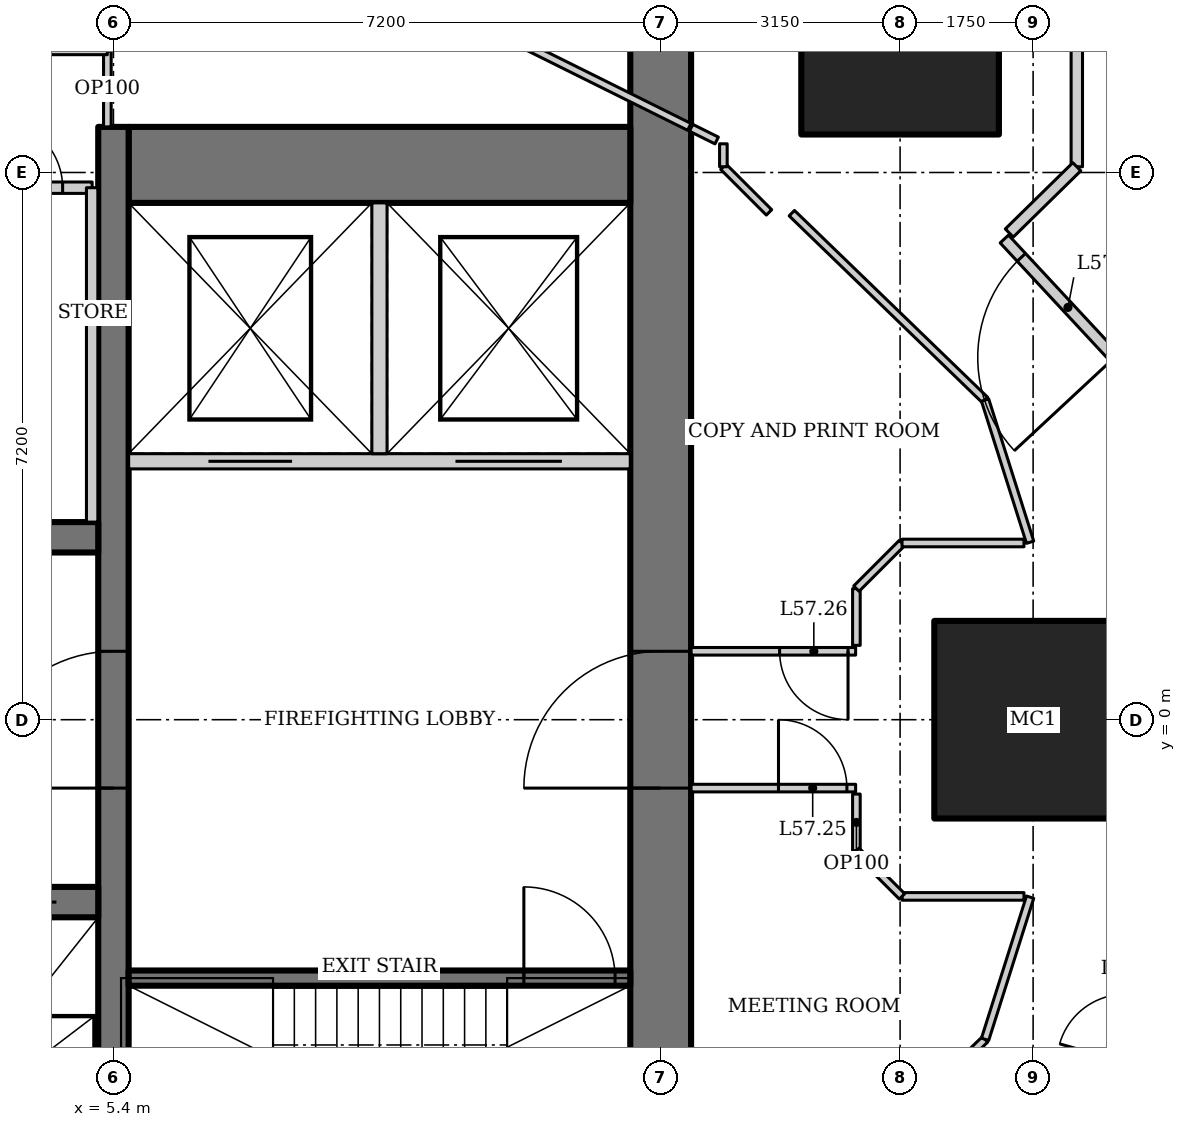
"""IFC4 building model, lengths in metres.
Left out: names, types, materials, properties, quantities, classifications, styles, units other than length and angle.
Written with IfcOpenShell. Run it as: python <this file> out.ifc"""

import sys

from ifc_helpers import new_model, si_unit, direction, frame, frame_2d, origin, origin_2d, place, context, subcontext, project, spatial, rectangle, hollow_rectangle, extrude, element, fill, save


model = new_model("IFC4")
c1 = context("Model", 3, precision=1e-05, world=origin(), true_north=direction((0.0, 1.0)))
c2 = subcontext(c1, "Body", "Model", "MODEL_VIEW")
j1 = project(units=[si_unit("LENGTHUNIT", "METRE"), si_unit("PLANEANGLEUNIT", "RADIAN")], contexts=[c1])
p1 = place(None, origin())
s1 = spatial("IfcSite", under=j1, at=p1, CompositionType="ELEMENT")
p2 = place(p1, origin())
s2 = spatial("IfcBuilding", under=s1, at=p2, CompositionType="ELEMENT")
p3 = place(p2, frame((0.0, 0.0, 245.2)))
s3 = spatial("IfcBuildingStorey", under=s2, at=p3, CompositionType="ELEMENT", Elevation=245.2)
for number, where, z_axis, x_axis in (
    (1, (17.5, 0.0, 0.0), (0.0, 0.0, 1.0), (1.0, 0.0, 0.0)),
    (2, (15.75, 9.0, 0.0), (0.0, 0.0, 1.0), (1.0, 0.0, 0.0)),
):
    element("IfcColumn", number, at=place(p3, frame(where, z_axis=z_axis, x_axis=x_axis)), inside=s3, PredefinedType="COLUMN", context=c2, shape_type="SweptSolid", body=[
        extrude(hollow_rectangle(XDim=2.6, YDim=2.6, WallThickness=0.13, at=origin_2d()), origin(), (0.0, 0.0, 1.0), 4.2),
    ])
p4 = place(p3, frame((12.6, -11.0, 0.0), z_axis=(0.0, 0.0, 1.0), x_axis=(0.0, 1.0, 0.0)))
e3 = element("IfcWall", 3, at=p4, inside=s3, PredefinedType="SHEAR", context=c2, shape_type="SweptSolid", body=[
    extrude(rectangle(XDim=22.0, YDim=0.8, at=frame_2d((11.0, 0.0))), origin(), (0.0, 0.0, 1.0), 4.2),
])
p5 = place(p4, frame((10.1, 0.0, 0.0)))
e4 = element("IfcOpeningElement", 4, at=p5, cuts=e3, PredefinedType="OPENING", context=c2, shape_type="SweptSolid", body=[
    extrude(rectangle(XDim=1.8, YDim=2.1, at=frame_2d((0.9, 1.05))), frame((0.0, 0.41, 0.0), z_axis=(0.0, -1.0, 0.0), x_axis=(1.0, 0.0, 0.0)), (0.0, 0.0, 1.0), 0.82),
])
p6 = place(p3, frame((12.2, 7.3, 0.0), z_axis=(0.0, 0.0, 1.0), x_axis=(-1.0, 0.0, 0.0)))
e5 = element("IfcWall", 5, at=p6, inside=s3, PredefinedType="SHEAR", context=c2, shape_type="SweptSolid", body=[
    extrude(rectangle(XDim=6.6, YDim=1.0, at=frame_2d((3.3, 0.0))), origin(), (0.0, 0.0, 1.0), 4.2),
])
p7 = place(p3, frame((5.4, -6.8, 0.0), z_axis=(0.0, 0.0, 1.0), x_axis=(0.0, 1.0, 0.0)))
e6 = element("IfcWall", 6, at=p7, inside=s3, PredefinedType="SHEAR", context=c2, shape_type="SweptSolid", body=[
    extrude(rectangle(XDim=14.6, YDim=0.4, at=frame_2d((7.3, 0.0))), origin(), (0.0, 0.0, 1.0), 4.2),
])
p8 = place(p7, frame((5.9, 0.0, 0.0)))
e7 = element("IfcOpeningElement", 7, at=p8, cuts=e6, PredefinedType="OPENING", context=c2, shape_type="SweptSolid", body=[
    extrude(rectangle(XDim=1.8, YDim=2.1, at=frame_2d((0.9, 1.05))), frame((0.0, 0.21, 0.0), z_axis=(0.0, -1.0, 0.0), x_axis=(1.0, 0.0, 0.0)), (0.0, 0.0, 1.0), 0.42),
])
p9 = place(p3, frame((-5.2, -2.4, 0.0), z_axis=(0.0, 0.0, 1.0), x_axis=(1.0, 0.0, 0.0)))
e8 = element("IfcWall", 8, at=p9, inside=s3, PredefinedType="SHEAR", context=c2, shape_type="SweptSolid", body=[
    extrude(rectangle(XDim=10.4, YDim=0.4, at=frame_2d((5.2, 0.0))), origin(), (0.0, 0.0, 1.0), 4.2),
])
p10 = place(p9, frame((1.683, 0.0, 0.0)))
e9 = element("IfcOpeningElement", 9, at=p10, cuts=e8, PredefinedType="OPENING", context=c2, shape_type="SweptSolid", body=[
    extrude(rectangle(XDim=1.1, YDim=2.2, at=frame_2d((0.55, 1.1))), frame((0.0, 0.21, 0.0), z_axis=(0.0, -1.0, 0.0), x_axis=(1.0, 0.0, 0.0)), (0.0, 0.0, 1.0), 0.42),
])
p11 = place(p9, frame((5.217, 0.0, 0.0)))
e10 = element("IfcOpeningElement", 10, at=p11, cuts=e8, PredefinedType="OPENING", context=c2, shape_type="SweptSolid", body=[
    extrude(rectangle(XDim=1.1, YDim=2.2, at=frame_2d((0.55, 1.1))), frame((0.0, 0.21, 0.0), z_axis=(0.0, -1.0, 0.0), x_axis=(1.0, 0.0, 0.0)), (0.0, 0.0, 1.0), 0.42),
])
p12 = place(p9, frame((8.75, 0.0, 0.0)))
e11 = element("IfcOpeningElement", 11, at=p12, cuts=e8, PredefinedType="OPENING", context=c2, shape_type="SweptSolid", body=[
    extrude(rectangle(XDim=1.1, YDim=2.2, at=frame_2d((0.55, 1.1))), frame((0.0, 0.21, 0.0), z_axis=(0.0, -1.0, 0.0), x_axis=(1.0, 0.0, 0.0)), (0.0, 0.0, 1.0), 0.42),
])
p13 = place(p3, frame((5.2, 2.4, 0.0), z_axis=(0.0, 0.0, 1.0), x_axis=(-1.0, 0.0, 0.0)))
e12 = element("IfcWall", 12, at=p13, inside=s3, PredefinedType="SHEAR", context=c2, shape_type="SweptSolid", body=[
    extrude(rectangle(XDim=10.4, YDim=0.4, at=frame_2d((5.2, 0.0))), origin(), (0.0, 0.0, 1.0), 4.2),
])
p14 = place(p3, frame((5.6, -3.4, 0.0), z_axis=(0.0, 0.0, 1.0), x_axis=(1.0, 0.0, 0.0)))
e13 = element("IfcWall", 13, at=p14, inside=s3, PredefinedType="SHEAR", context=c2, shape_type="SweptSolid", body=[
    extrude(rectangle(XDim=6.6, YDim=0.2, at=frame_2d((3.3, 0.0))), origin(), (0.0, 0.0, 1.0), 4.2),
])
p15 = place(p14, frame((5.2, 0.0, 0.0)))
e14 = element("IfcOpeningElement", 14, at=p15, cuts=e13, PredefinedType="OPENING", context=c2, shape_type="SweptSolid", body=[
    extrude(rectangle(XDim=1.2, YDim=2.1, at=frame_2d((0.6, 1.05))), frame((0.0, 0.11, 0.0), z_axis=(0.0, -1.0, 0.0), x_axis=(1.0, 0.0, 0.0)), (0.0, 0.0, 1.0), 0.22),
])
p16 = place(p3, frame((12.2, 3.4, 0.0), z_axis=(0.0, 0.0, 1.0), x_axis=(-1.0, 0.0, 0.0)))
e15 = element("IfcWall", 15, at=p16, inside=s3, PredefinedType="SOLIDWALL", context=c2, shape_type="SweptSolid", body=[
    extrude(rectangle(XDim=6.6, YDim=0.2, at=frame_2d((3.3, 0.0))), origin(), (0.0, 0.0, 1.0), 4.2),
])
p17 = place(p16, frame((4.45, 0.0, 0.0)))
e16 = element("IfcOpeningElement", 16, at=p17, cuts=e15, PredefinedType="OPENING", context=c2, shape_type="SweptSolid", body=[
    extrude(rectangle(XDim=1.1, YDim=2.2, at=frame_2d((0.55, 1.1))), frame((0.0, 0.11, 0.0), z_axis=(0.0, -1.0, 0.0), x_axis=(1.0, 0.0, 0.0)), (0.0, 0.0, 1.0), 0.22),
])
p18 = place(p16, frame((0.9, 0.0, 0.0)))
e17 = element("IfcOpeningElement", 17, at=p18, cuts=e15, PredefinedType="OPENING", context=c2, shape_type="SweptSolid", body=[
    extrude(rectangle(XDim=1.4, YDim=2.2, at=frame_2d((0.7, 1.1))), frame((0.0, 0.11, 0.0), z_axis=(0.0, -1.0, 0.0), x_axis=(1.0, 0.0, 0.0)), (0.0, 0.0, 1.0), 0.22),
])
p19 = place(p3, frame((8.9, 3.5, 0.0), z_axis=(0.0, 0.0, 1.0), x_axis=(0.0, 1.0, 0.0)))
e18 = element("IfcWall", 18, at=p19, inside=s3, PredefinedType="SOLIDWALL", context=c2, shape_type="SweptSolid", body=[
    extrude(rectangle(XDim=3.3, YDim=0.2, at=frame_2d((1.65, 0.0))), origin(), (0.0, 0.0, 1.0), 4.2),
])
p20 = place(p3, frame((-5.12, 7.0, 0.0), z_axis=(0.0, 0.0, 1.0), x_axis=(1.0, 0.0, 0.0)))
e19 = element("IfcWall", 19, at=p20, inside=s3, PredefinedType="SOLIDWALL", context=c2, shape_type="SweptSolid", body=[
    extrude(rectangle(XDim=10.24, YDim=0.15, at=frame_2d((5.12, 0.0))), origin(), (0.0, 0.0, 1.0), 4.05),
])
p21 = place(p20, frame((1.2, 0.0, 0.0)))
e20 = element("IfcOpeningElement", 20, at=p21, cuts=e19, PredefinedType="OPENING", context=c2, shape_type="SweptSolid", body=[
    extrude(rectangle(XDim=0.9, YDim=2.1, at=frame_2d((0.45, 1.05))), frame((0.0, 0.085, 0.0), z_axis=(0.0, -1.0, 0.0), x_axis=(1.0, 0.0, 0.0)), (0.0, 0.0, 1.0), 0.17),
])
p22 = place(p20, frame((4.477, 0.0, 0.0)))
e21 = element("IfcOpeningElement", 21, at=p22, cuts=e19, PredefinedType="OPENING", context=c2, shape_type="SweptSolid", body=[
    extrude(rectangle(XDim=0.9, YDim=2.1, at=frame_2d((0.45, 1.05))), frame((0.0, 0.085, 0.0), z_axis=(0.0, -1.0, 0.0), x_axis=(1.0, 0.0, 0.0)), (0.0, 0.0, 1.0), 0.17),
])
p23 = place(p20, frame((7.054, 0.0, 0.0)))
e22 = element("IfcOpeningElement", 22, at=p23, cuts=e19, PredefinedType="OPENING", context=c2, shape_type="SweptSolid", body=[
    extrude(rectangle(XDim=1.0, YDim=2.1, at=frame_2d((0.5, 1.05))), frame((0.0, 0.085, 0.0), z_axis=(0.0, -1.0, 0.0), x_axis=(1.0, 0.0, 0.0)), (0.0, 0.0, 1.0), 0.17),
])
p24 = place(p20, frame((8.952, 0.0, 0.0)))
e23 = element("IfcOpeningElement", 23, at=p24, cuts=e19, PredefinedType="OPENING", context=c2, shape_type="SweptSolid", body=[
    extrude(rectangle(XDim=0.9, YDim=2.1, at=frame_2d((0.45, 1.05))), frame((0.0, 0.085, 0.0), z_axis=(0.0, -1.0, 0.0), x_axis=(1.0, 0.0, 0.0)), (0.0, 0.0, 1.0), 0.17),
])
p25 = place(p3, frame((5.12, 2.6, 0.0), z_axis=(0.0, 0.0, 1.0), x_axis=(0.0, 1.0, 0.0)))
e24 = element("IfcWall", 24, at=p25, inside=s3, PredefinedType="SOLIDWALL", context=c2, shape_type="SweptSolid", body=[
    extrude(rectangle(XDim=4.4, YDim=0.15, at=frame_2d((2.2, 0.0))), origin(), (0.0, 0.0, 1.0), 4.05),
])
p26 = place(p3, frame((13.0, 7.788, 0.0), z_axis=(0.0, 0.0, 1.0), x_axis=(0.895721570004, -0.444615416995, 0.0)))
e25 = element("IfcWall", 25, at=p26, inside=s3, PredefinedType="PARTITIONING", context=c2, shape_type="SweptSolid", body=[
    extrude(rectangle(XDim=0.376, YDim=0.1, at=frame_2d((0.188, 0.0))), origin(), (0.0, 0.0, 1.0), 4.05),
])
p27 = place(p3, frame((5.32, 7.8, 0.0), z_axis=(0.0, 0.0, 1.0), x_axis=(0.0, 1.0, 0.0)))
e26 = element("IfcWall", 26, at=p27, inside=s3, PredefinedType="PARTITIONING", context=c2, shape_type="SweptSolid", body=[
    extrude(rectangle(XDim=1.0, YDim=0.1, at=frame_2d((0.5, 0.0))), origin(), (0.0, 0.0, 1.0), 4.05),
])
p28 = place(p3, frame((5.32, 8.8, 0.0), z_axis=(0.0, 0.0, 1.0), x_axis=(-1.0, 0.0, 0.0)))
e27 = element("IfcWall", 27, at=p28, inside=s3, PredefinedType="PARTITIONING", context=c2, shape_type="SweptSolid", body=[
    extrude(rectangle(XDim=4.42, YDim=0.1, at=frame_2d((2.21, 0.0))), origin(), (0.0, 0.0, 1.0), 4.05),
])
p29 = place(p28, frame((1.76, 0.0, 0.0)))
e28 = element("IfcOpeningElement", 28, at=p29, cuts=e27, PredefinedType="OPENING", context=c2, shape_type="SweptSolid", body=[
    extrude(rectangle(XDim=0.9, YDim=2.1, at=frame_2d((0.45, 1.05))), frame((0.0, 0.06, 0.0), z_axis=(0.0, -1.0, 0.0), x_axis=(1.0, 0.0, 0.0)), (0.0, 0.0, 1.0), 0.12),
])
p30 = place(p3, frame((9.298, 9.628, 0.0), z_axis=(0.0, 0.0, 1.0), x_axis=(0.895529831139, -0.445001484874, 0.0)))
e29 = element("IfcWall", 29, at=p30, inside=s3, PredefinedType="PARTITIONING", context=c2, shape_type="SweptSolid", body=[
    extrude(rectangle(XDim=4.108, YDim=0.1, at=frame_2d((2.054, 0.0))), origin(), (0.0, 0.0, 1.0), 4.05),
])
p31 = place(p3, frame((16.868, -4.206, 0.0), z_axis=(0.0, 0.0, 1.0), x_axis=(-0.718810161381, -0.695206409562, 0.0)))
e30 = element("IfcWall", 30, at=p31, inside=s3, PredefinedType="PARTITIONING", context=c2, shape_type="SweptSolid", body=[
    extrude(rectangle(XDim=3.537, YDim=0.1, at=frame_2d((1.769, 0.0))), origin(), (0.0, 0.0, 1.0), 4.05),
])
p32 = place(p3, frame((18.673, 4.656, 0.0), z_axis=(0.0, 0.0, 1.0), x_axis=(-0.680985069419, 0.732297299755, 0.0)))
e31 = element("IfcWall", 31, at=p32, inside=s3, PredefinedType="PARTITIONING", context=c2, shape_type="SweptSolid", body=[
    extrude(rectangle(XDim=2.279, YDim=0.15, at=frame_2d((1.14, 0.0))), origin(), (0.0, 0.0, 1.0), 4.05),
])
p33 = place(p32, frame((0.15, 0.0, 0.0)))
e32 = element("IfcOpeningElement", 32, at=p33, cuts=e31, PredefinedType="OPENING", context=c2, shape_type="SweptSolid", body=[
    extrude(rectangle(XDim=1.8, YDim=2.1, at=frame_2d((0.9, 1.05))), frame((0.0, 0.085, 0.0), z_axis=(0.0, -1.0, 0.0), x_axis=(1.0, 0.0, 0.0)), (0.0, 0.0, 1.0), 0.17),
])
p34 = place(p3, frame((14.325, 6.665, 0.0), z_axis=(0.0, 0.0, 1.0), x_axis=(0.718810161381, -0.695206409562, 0.0)))
e33 = element("IfcWall", 33, at=p34, inside=s3, PredefinedType="PARTITIONING", context=c2, shape_type="SweptSolid", body=[
    extrude(rectangle(XDim=3.537, YDim=0.1, at=frame_2d((1.769, 0.0))), origin(), (0.0, 0.0, 1.0), 4.05),
])
p35 = place(p3, frame((14.025, 6.675, 0.0), z_axis=(0.0, 0.0, 1.0), x_axis=(-0.707106781187, 0.707106781187, 0.0)))
e34 = element("IfcWall", 34, at=p35, inside=s3, PredefinedType="PARTITIONING", context=c2, shape_type="SweptSolid", body=[
    extrude(rectangle(XDim=0.849, YDim=0.1, at=frame_2d((0.425, 0.0))), origin(), (0.0, 0.0, 1.0), 4.05),
])
p36 = place(p3, frame((13.425, 7.275, 0.0), z_axis=(0.0, 0.0, 1.0), x_axis=(0.0, 1.0, 0.0)))
e35 = element("IfcWall", 35, at=p36, inside=s3, PredefinedType="PARTITIONING", context=c2, shape_type="SweptSolid", body=[
    extrude(rectangle(XDim=0.302, YDim=0.1, at=frame_2d((0.151, 0.0))), origin(), (0.0, 0.0, 1.0), 4.05),
])
p37 = place(p3, frame((18.075, 10.725, 0.0), z_axis=(0.0, 0.0, 1.0), x_axis=(0.0, -1.0, 0.0)))
e36 = element("IfcWall", 36, at=p37, inside=s3, PredefinedType="PARTITIONING", context=c2, shape_type="SweptSolid", body=[
    extrude(rectangle(XDim=3.449, YDim=0.15, at=frame_2d((1.725, 0.0))), origin(), (0.0, 0.0, 1.0), 3.601),
])
p38 = place(p3, frame((18.075, 7.275, 0.0), z_axis=(0.0, 0.0, 1.0), x_axis=(-0.713842064016, -0.700306723973, 0.0)))
e37 = element("IfcWall", 37, at=p38, inside=s3, PredefinedType="PARTITIONING", context=c2, shape_type="SweptSolid", body=[
    extrude(rectangle(XDim=1.245, YDim=0.15, at=frame_2d((0.622, 0.0))), origin(), (0.0, 0.0, 1.0), 4.05),
])
p39 = place(p3, frame((13.0, -0.9, 0.0), z_axis=(0.0, 0.0, 1.0), x_axis=(1.0, 0.0, 0.0)))
e38 = element("IfcWall", 38, at=p39, inside=s3, PredefinedType="PARTITIONING", context=c2, shape_type="SweptSolid", body=[
    extrude(rectangle(XDim=2.165, YDim=0.1, at=frame_2d((1.083, 0.0))), origin(), (0.0, 0.0, 1.0), 4.05),
])
p40 = place(p39, frame((1.15, 0.0, 0.0)))
e39 = element("IfcOpeningElement", 39, at=p40, cuts=e38, PredefinedType="OPENING", context=c2, shape_type="SweptSolid", body=[
    extrude(rectangle(XDim=0.9, YDim=2.1, at=frame_2d((0.45, 1.05))), frame((0.0, 0.06, 0.0), z_axis=(0.0, -1.0, 0.0), x_axis=(1.0, 0.0, 0.0)), (0.0, 0.0, 1.0), 0.12),
])
for number, where, z_axis, x_axis in (
    (40, (17.46, -2.335, 0.0), (0.0, 0.0, 1.0), (-0.302, -0.953, 0.0)),
    (41, (16.868, 4.206, 0.0), (0.0, 0.0, 1.0), (0.302, -0.953, 0.0)),
):
    element("IfcWall", number, at=place(p3, frame(where, z_axis=z_axis, x_axis=x_axis)), inside=s3, PredefinedType="PARTITIONING", context=c2, shape_type="SweptSolid", body=[
        extrude(rectangle(XDim=1.962, YDim=0.1, at=frame_2d((0.981, 0.0))), origin(), (0.0, 0.0, 1.0), 4.05),
    ])
p41 = place(p3, frame((15.165, 0.9, 0.0), z_axis=(0.0, 0.0, 1.0), x_axis=(-1.0, 0.0, 0.0)))
e42 = element("IfcWall", 42, at=p41, inside=s3, PredefinedType="PARTITIONING", context=c2, shape_type="SweptSolid", body=[
    extrude(rectangle(XDim=2.165, YDim=0.1, at=frame_2d((1.083, 0.0))), origin(), (0.0, 0.0, 1.0), 4.05),
])
p42 = place(p41, frame((0.1, 0.0, 0.0)))
e43 = element("IfcOpeningElement", 43, at=p42, cuts=e42, PredefinedType="OPENING", context=c2, shape_type="SweptSolid", body=[
    extrude(rectangle(XDim=0.9, YDim=2.1, at=frame_2d((0.45, 1.05))), frame((0.0, 0.06, 0.0), z_axis=(0.0, -1.0, 0.0), x_axis=(1.0, 0.0, 0.0)), (0.0, 0.0, 1.0), 0.12),
])
p43 = place(p3, frame((15.175, -1.725, 0.0), z_axis=(0.0, 0.0, 1.0), x_axis=(0.0, 1.0, 0.0)))
e44 = element("IfcWall", 44, at=p43, inside=s3, PredefinedType="PARTITIONING", context=c2, shape_type="SweptSolid", body=[
    extrude(rectangle(XDim=0.746, YDim=0.1, at=frame_2d((0.373, 0.0))), origin(), (0.0, 0.0, 1.0), 4.05),
])
p44 = place(p3, frame((17.38, -2.325, 0.0), z_axis=(0.0, 0.0, 1.0), x_axis=(-1.0, 0.0, 0.0)))
e45 = element("IfcWall", 45, at=p44, inside=s3, PredefinedType="PARTITIONING", context=c2, shape_type="SweptSolid", body=[
    extrude(rectangle(XDim=1.604, YDim=0.1, at=frame_2d((0.802, 0.0))), origin(), (0.0, 0.0, 1.0), 4.05),
])
p45 = place(p3, frame((15.775, -2.325, 0.0), z_axis=(0.0, 0.0, 1.0), x_axis=(-0.707106781187, 0.707106781187, 0.0)))
e46 = element("IfcWall", 46, at=p45, inside=s3, PredefinedType="PARTITIONING", context=c2, shape_type="SweptSolid", body=[
    extrude(rectangle(XDim=0.849, YDim=0.1, at=frame_2d((0.425, 0.0))), origin(), (0.0, 0.0, 1.0), 4.05),
])
p46 = place(p3, frame((15.175, 0.978, 0.0), z_axis=(0.0, 0.0, 1.0), x_axis=(0.0, 1.0, 0.0)))
e47 = element("IfcWall", 47, at=p46, inside=s3, PredefinedType="PARTITIONING", context=c2, shape_type="SweptSolid", body=[
    extrude(rectangle(XDim=0.746, YDim=0.1, at=frame_2d((0.373, 0.0))), origin(), (0.0, 0.0, 1.0), 4.05),
])
p47 = place(p3, frame((15.175, 1.725, 0.0), z_axis=(0.0, 0.0, 1.0), x_axis=(0.707106781187, 0.707106781187, 0.0)))
e48 = element("IfcWall", 48, at=p47, inside=s3, PredefinedType="PARTITIONING", context=c2, shape_type="SweptSolid", body=[
    extrude(rectangle(XDim=0.849, YDim=0.1, at=frame_2d((0.425, 0.0))), origin(), (0.0, 0.0, 1.0), 4.05),
])
p48 = place(p3, frame((15.775, 2.325, 0.0), z_axis=(0.0, 0.0, 1.0), x_axis=(1.0, 0.0, 0.0)))
e49 = element("IfcWall", 49, at=p48, inside=s3, PredefinedType="PARTITIONING", context=c2, shape_type="SweptSolid", body=[
    extrude(rectangle(XDim=1.604, YDim=0.1, at=frame_2d((0.802, 0.0))), origin(), (0.0, 0.0, 1.0), 4.05),
])
p49 = place(p8, origin())
e50 = element("IfcDoor", 50, at=p49, inside=s3, OperationType="DOUBLE_DOOR_DOUBLE_SWING", PredefinedType="DOOR", context=c2, shape_type="SweptSolid", body=[
    extrude(rectangle(XDim=1.8, YDim=2.1, at=frame_2d((0.9, 1.05))), frame((0.0, 0.025, 0.0), z_axis=(0.0, -1.0, 0.0), x_axis=(1.0, 0.0, 0.0)), (0.0, 0.0, 1.0), 0.05),
])
fill(e7, e50)
p50 = place(p15, origin())
e51 = element("IfcDoor", 51, at=p50, inside=s3, OperationType="SINGLE_SWING_RIGHT", PredefinedType="DOOR", context=c2, shape_type="SweptSolid", body=[
    extrude(rectangle(XDim=1.2, YDim=2.1, at=frame_2d((0.6, 1.05))), frame((0.0, 0.025, 0.0), z_axis=(0.0, -1.0, 0.0), x_axis=(1.0, 0.0, 0.0)), (0.0, 0.0, 1.0), 0.05),
])
fill(e14, e51)
p51 = place(p5, origin())
e52 = element("IfcDoor", 52, at=p51, inside=s3, OperationType="DOUBLE_DOOR_DOUBLE_SWING", PredefinedType="DOOR", context=c2, shape_type="SweptSolid", body=[
    extrude(rectangle(XDim=1.8, YDim=2.1, at=frame_2d((0.9, 1.05))), frame((0.0, 0.025, 0.0), z_axis=(0.0, -1.0, 0.0), x_axis=(1.0, 0.0, 0.0)), (0.0, 0.0, 1.0), 0.05),
])
fill(e4, e52)
p52 = place(p12, origin())
e53 = element("IfcDoor", 53, at=p52, inside=s3, OperationType="DOUBLE_DOOR_SLIDING", PredefinedType="DOOR", context=c2, shape_type="SweptSolid", body=[
    extrude(rectangle(XDim=1.1, YDim=2.2, at=frame_2d((0.55, 1.1))), frame((0.0, 0.025, 0.0), z_axis=(0.0, -1.0, 0.0), x_axis=(1.0, 0.0, 0.0)), (0.0, 0.0, 1.0), 0.05),
])
fill(e11, e53)
p53 = place(p17, origin())
e54 = element("IfcDoor", 54, at=p53, inside=s3, OperationType="DOUBLE_DOOR_SLIDING", PredefinedType="DOOR", context=c2, shape_type="SweptSolid", body=[
    extrude(rectangle(XDim=1.1, YDim=2.2, at=frame_2d((0.55, 1.1))), frame((0.0, 0.025, 0.0), z_axis=(0.0, -1.0, 0.0), x_axis=(1.0, 0.0, 0.0)), (0.0, 0.0, 1.0), 0.05),
])
fill(e16, e54)
p54 = place(p18, origin())
e55 = element("IfcDoor", 55, at=p54, inside=s3, OperationType="DOUBLE_DOOR_SLIDING", PredefinedType="DOOR", context=c2, shape_type="SweptSolid", body=[
    extrude(rectangle(XDim=1.4, YDim=2.2, at=frame_2d((0.7, 1.1))), frame((0.0, 0.025, 0.0), z_axis=(0.0, -1.0, 0.0), x_axis=(1.0, 0.0, 0.0)), (0.0, 0.0, 1.0), 0.05),
])
fill(e17, e55)
p55 = place(p24, origin())
e56 = element("IfcDoor", 56, at=p55, inside=s3, OperationType="SINGLE_SWING_LEFT", PredefinedType="DOOR", context=c2, shape_type="SweptSolid", body=[
    extrude(rectangle(XDim=0.9, YDim=2.1, at=frame_2d((0.45, 1.05))), frame((0.0, 0.025, 0.0), z_axis=(0.0, -1.0, 0.0), x_axis=(1.0, 0.0, 0.0)), (0.0, 0.0, 1.0), 0.05),
])
fill(e23, e56)
p56 = place(p40, origin())
e57 = element("IfcDoor", 57, at=p56, inside=s3, OperationType="SINGLE_SWING_LEFT", PredefinedType="DOOR", context=c2, shape_type="SweptSolid", body=[
    extrude(rectangle(XDim=0.9, YDim=2.1, at=frame_2d((0.45, 1.05))), frame((0.0, 0.025, 0.0), z_axis=(0.0, -1.0, 0.0), x_axis=(1.0, 0.0, 0.0)), (0.0, 0.0, 1.0), 0.05),
])
fill(e39, e57)
p57 = place(p42, origin())
e58 = element("IfcDoor", 58, at=p57, inside=s3, OperationType="SINGLE_SWING_LEFT", PredefinedType="DOOR", context=c2, shape_type="SweptSolid", body=[
    extrude(rectangle(XDim=0.9, YDim=2.1, at=frame_2d((0.45, 1.05))), frame((0.0, 0.025, 0.0), z_axis=(0.0, -1.0, 0.0), x_axis=(1.0, 0.0, 0.0)), (0.0, 0.0, 1.0), 0.05),
])
fill(e43, e58)
p58 = place(p33, origin())
e59 = element("IfcDoor", 59, at=p58, inside=s3, OperationType="DOUBLE_DOOR_DOUBLE_SWING", PredefinedType="DOOR", context=c2, shape_type="SweptSolid", body=[
    extrude(rectangle(XDim=1.8, YDim=2.1, at=frame_2d((0.9, 1.05))), frame((0.0, 0.025, 0.0), z_axis=(0.0, -1.0, 0.0), x_axis=(1.0, 0.0, 0.0)), (0.0, 0.0, 1.0), 0.05),
])
fill(e32, e59)
save(model, sys.argv[1])
